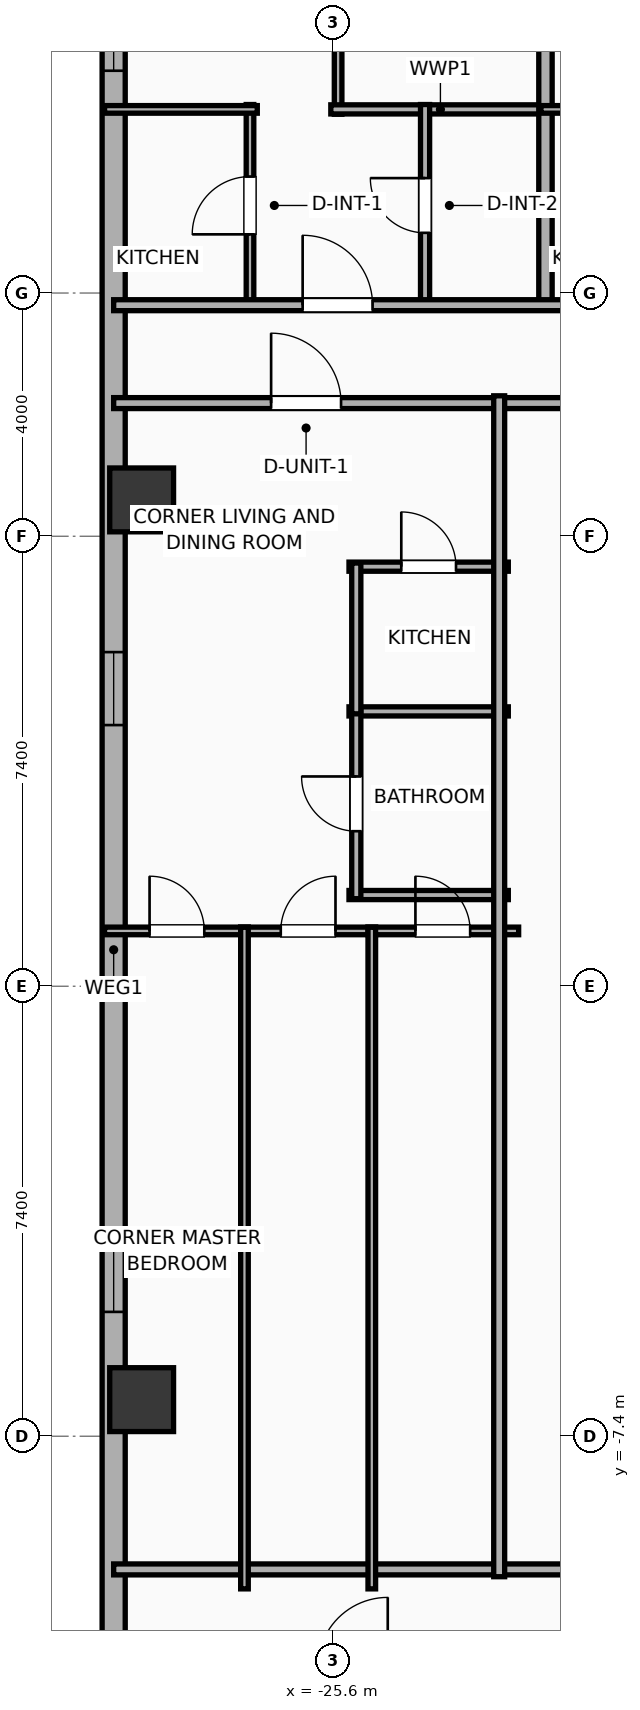
"""IFC4 building model, lengths in metres.
Left out: names, types, materials, properties, quantities, classifications, styles, units other than length and angle.
Written with IfcOpenShell. Run it as: python <this file> out.ifc"""

import sys

from ifc_helpers import new_model, si_unit, direction, frame, frame_2d, origin, origin_2d, place, context, subcontext, project, spatial, rectangle, hollow_rectangle, extrude, element, fill, save


model = new_model("IFC4")
c1 = context("Model", 3, precision=1e-05, world=origin(), true_north=direction((0.0, 1.0)))
c2 = subcontext(c1, "Body", "Model", "MODEL_VIEW")
j1 = project(units=[si_unit("LENGTHUNIT", "METRE"), si_unit("PLANEANGLEUNIT", "RADIAN")], contexts=[c1])
p1 = place(None, origin())
s1 = spatial("IfcSite", under=j1, at=p1, CompositionType="ELEMENT")
p2 = place(p1, origin())
s2 = spatial("IfcBuilding", under=s1, at=p2, CompositionType="ELEMENT")
p3 = place(p2, frame((0.0, 0.0, 120.9)))
s3 = spatial("IfcBuildingStorey", under=s2, at=p3, CompositionType="ELEMENT", Elevation=120.9)
for number, where, z_axis, x_axis in (
    (1, (-28.75, 7.998, 0.0), (0.0, 0.0, 1.0), (1.0, 0.0, 0.0)),
    (2, (-28.75, -6.798, 0.0), (0.0, 0.0, 1.0), (1.0, 0.0, 0.0)),
):
    element("IfcColumn", number, at=place(p3, frame(where, z_axis=z_axis, x_axis=x_axis)), inside=s3, PredefinedType="COLUMN", context=c2, shape_type="SweptSolid", body=[
        extrude(hollow_rectangle(XDim=1.05, YDim=1.05, WallThickness=0.036, at=origin_2d()), origin(), (0.0, 0.0, 1.0), 3.9),
    ])
p4 = place(p3, frame((-29.21, -16.581, 0.0), z_axis=(0.0, 0.0, 1.0), x_axis=(0.0, 1.0, 0.0)))
e3 = element("IfcWall", 3, at=p4, inside=s3, PredefinedType="ELEMENTEDWALL", context=c2, shape_type="SweptSolid", body=[
    extrude(rectangle(XDim=34.363, YDim=0.38, at=frame_2d((17.181, 0.0))), origin(), (0.0, 0.0, 1.0), 3.65),
])
p5 = place(p4, frame((31.637, 0.0, 0.75)))
e4 = element("IfcOpeningElement", 4, at=p5, cuts=e3, PredefinedType="OPENING", context=c2, shape_type="SweptSolid", body=[
    extrude(rectangle(XDim=1.2, YDim=2.05, at=frame_2d((0.6, 1.025))), frame((0.0, 0.2, 0.0), z_axis=(0.0, -1.0, 0.0), x_axis=(1.0, 0.0, 0.0)), (0.0, 0.0, 1.0), 0.4),
])
p6 = place(p4, frame((20.876, 0.0, 0.75)))
e5 = element("IfcOpeningElement", 5, at=p6, cuts=e3, PredefinedType="OPENING", context=c2, shape_type="SweptSolid", body=[
    extrude(rectangle(XDim=1.2, YDim=2.05, at=frame_2d((0.6, 1.025))), frame((0.0, 0.2, 0.0), z_axis=(0.0, -1.0, 0.0), x_axis=(1.0, 0.0, 0.0)), (0.0, 0.0, 1.0), 0.4),
])
p7 = place(p4, frame((11.226, 0.0, 0.75)))
e6 = element("IfcOpeningElement", 6, at=p7, cuts=e3, PredefinedType="OPENING", context=c2, shape_type="SweptSolid", body=[
    extrude(rectangle(XDim=1.2, YDim=2.05, at=frame_2d((0.6, 1.025))), frame((0.0, 0.2, 0.0), z_axis=(0.0, -1.0, 0.0), x_axis=(1.0, 0.0, 0.0)), (0.0, 0.0, 1.0), 0.4),
])
p8 = place(p3, frame((-29.21, 9.59, 0.0), z_axis=(0.0, 0.0, 1.0), x_axis=(1.0, 0.0, 0.0)))
e7 = element("IfcWall", 7, at=p8, inside=s3, PredefinedType="PARTITIONING", context=c2, shape_type="SweptSolid", body=[
    extrude(rectangle(XDim=19.33, YDim=0.18, at=frame_2d((9.665, 0.0))), origin(), (0.0, 0.0, 1.0), 3.65),
])
p9 = place(p8, frame((2.589, 0.0, 0.0)))
e8 = element("IfcOpeningElement", 8, at=p9, cuts=e7, PredefinedType="OPENING", context=c2, shape_type="SweptSolid", body=[
    extrude(rectangle(XDim=1.15, YDim=2.05, at=frame_2d((0.575, 1.025))), frame((0.0, 0.1, 0.0), z_axis=(0.0, -1.0, 0.0), x_axis=(1.0, 0.0, 0.0)), (0.0, 0.0, 1.0), 0.2),
])
p10 = place(p3, frame((-29.21, -9.59, 0.0), z_axis=(0.0, 0.0, 1.0), x_axis=(1.0, 0.0, 0.0)))
e9 = element("IfcWall", 9, at=p10, inside=s3, PredefinedType="PARTITIONING", context=c2, shape_type="SweptSolid", body=[
    extrude(rectangle(XDim=19.33, YDim=0.18, at=frame_2d((9.665, 0.0))), origin(), (0.0, 0.0, 1.0), 3.65),
])
p11 = place(p3, frame((-25.519, 14.34, 0.0), z_axis=(0.0, 0.0, 1.0), x_axis=(0.0, 1.0, 0.0)))
e10 = element("IfcWall", 10, at=p11, inside=s3, PredefinedType="PARTITIONING", context=c2, shape_type="SweptSolid", body=[
    extrude(rectangle(XDim=7.396, YDim=0.125, at=frame_2d((3.698, 0.0))), origin(), (0.0, 0.0, 1.0), 3.65),
])
p12 = place(p11, frame((1.325, 0.0, 0.0)))
e11 = element("IfcOpeningElement", 11, at=p12, cuts=e10, PredefinedType="OPENING", context=c2, shape_type="SweptSolid", body=[
    extrude(rectangle(XDim=0.9, YDim=2.05, at=frame_2d((0.45, 1.025))), frame((0.0, 0.073, 0.0), z_axis=(0.0, -1.0, 0.0), x_axis=(1.0, 0.0, 0.0)), (0.0, 0.0, 1.0), 0.145),
])
p13 = place(p3, frame((-25.639, 14.42, 0.0), z_axis=(0.0, 0.0, 1.0), x_axis=(1.0, 0.0, 0.0)))
e12 = element("IfcWall", 12, at=p13, inside=s3, PredefinedType="PLUMBINGWALL", context=c2, shape_type="SweptSolid", body=[
    extrude(rectangle(XDim=3.605, YDim=0.15, at=frame_2d((1.802, 0.0))), origin(), (0.0, 0.0, 1.0), 3.65),
])
p14 = place(p3, frame((-26.968, 11.18, 0.0), z_axis=(0.0, 0.0, 1.0), x_axis=(0.0, 1.0, 0.0)))
e13 = element("IfcWall", 13, at=p14, inside=s3, PredefinedType="PARTITIONING", context=c2, shape_type="SweptSolid", body=[
    extrude(rectangle(XDim=3.32, YDim=0.125, at=frame_2d((1.66, 0.0))), origin(), (0.0, 0.0, 1.0), 3.65),
])
p15 = place(p14, frame((1.185, 0.0, 0.0)))
e14 = element("IfcOpeningElement", 14, at=p15, cuts=e13, PredefinedType="OPENING", context=c2, shape_type="SweptSolid", body=[
    extrude(rectangle(XDim=0.95, YDim=2.05, at=frame_2d((0.475, 1.025))), frame((0.0, 0.073, 0.0), z_axis=(0.0, -1.0, 0.0), x_axis=(1.0, 0.0, 0.0)), (0.0, 0.0, 1.0), 0.145),
])
p16 = place(p3, frame((-29.36, 14.42, 0.0), z_axis=(0.0, 0.0, 1.0), x_axis=(1.0, 0.0, 0.0)))
e15 = element("IfcWall", 15, at=p16, inside=s3, PredefinedType="PARTITIONING", context=c2, shape_type="SweptSolid", body=[
    extrude(rectangle(XDim=2.512, YDim=0.125, at=frame_2d((1.256, 0.0))), origin(), (0.0, 0.0, 1.0), 3.65),
])
p17 = place(p3, frame((-24.089, 11.18, 0.0), z_axis=(0.0, 0.0, 1.0), x_axis=(0.0, 1.0, 0.0)))
e16 = element("IfcWall", 16, at=p17, inside=s3, PredefinedType="PLUMBINGWALL", context=c2, shape_type="SweptSolid", body=[
    extrude(rectangle(XDim=3.32, YDim=0.15, at=frame_2d((1.66, 0.0))), origin(), (0.0, 0.0, 1.0), 3.65),
])
p18 = place(p17, frame((1.21, 0.0, 0.0)))
e17 = element("IfcOpeningElement", 17, at=p18, cuts=e16, PredefinedType="OPENING", context=c2, shape_type="SweptSolid", body=[
    extrude(rectangle(XDim=0.9, YDim=2.05, at=frame_2d((0.45, 1.025))), frame((0.0, 0.085, 0.0), z_axis=(0.0, -1.0, 0.0), x_axis=(1.0, 0.0, 0.0)), (0.0, 0.0, 1.0), 0.17),
])
p19 = place(p3, frame((-22.109, 11.12, 0.0), z_axis=(0.0, 0.0, 1.0), x_axis=(0.0, 1.0, 0.0)))
e18 = element("IfcWall", 18, at=p19, inside=s3, PredefinedType="PARTITIONING", context=c2, shape_type="SweptSolid", body=[
    extrude(rectangle(XDim=10.49, YDim=0.22, at=frame_2d((5.245, 0.0))), origin(), (0.0, 0.0, 1.0), 3.65),
])
p20 = place(p3, frame((-22.184, 14.42, 0.0), z_axis=(0.0, 0.0, 1.0), x_axis=(1.0, 0.0, 0.0)))
e19 = element("IfcWall", 19, at=p20, inside=s3, PredefinedType="PARTITIONING", context=c2, shape_type="SweptSolid", body=[
    extrude(rectangle(XDim=2.505, YDim=0.125, at=frame_2d((1.252, 0.0))), origin(), (0.0, 0.0, 1.0), 3.65),
])
p21 = place(p3, frame((-29.21, 11.2, 0.0), z_axis=(0.0, 0.0, 1.0), x_axis=(1.0, 0.0, 0.0)))
e20 = element("IfcWall", 20, at=p21, inside=s3, PredefinedType="PARTITIONING", context=c2, shape_type="SweptSolid", body=[
    extrude(rectangle(XDim=62.42, YDim=0.18, at=frame_2d((31.21, 0.0))), origin(), (0.0, 0.0, 1.0), 3.65),
])
p22 = place(p21, frame((3.108, 0.0, 0.0)))
e21 = element("IfcOpeningElement", 21, at=p22, cuts=e20, PredefinedType="OPENING", context=c2, shape_type="SweptSolid", body=[
    extrude(rectangle(XDim=1.15, YDim=2.05, at=frame_2d((0.575, 1.025))), frame((0.0, 0.1, 0.0), z_axis=(0.0, -1.0, 0.0), x_axis=(1.0, 0.0, 0.0)), (0.0, 0.0, 1.0), 0.2),
])
p23 = place(p21, frame((10.242, 0.0, 0.0)))
e22 = element("IfcOpeningElement", 22, at=p23, cuts=e20, PredefinedType="OPENING", context=c2, shape_type="SweptSolid", body=[
    extrude(rectangle(XDim=1.15, YDim=2.05, at=frame_2d((0.575, 1.025))), frame((0.0, 0.1, 0.0), z_axis=(0.0, -1.0, 0.0), x_axis=(1.0, 0.0, 0.0)), (0.0, 0.0, 1.0), 0.2),
])
p24 = place(p21, frame((17.427, 0.0, 0.0)))
e23 = element("IfcOpeningElement", 23, at=p24, cuts=e20, PredefinedType="OPENING", context=c2, shape_type="SweptSolid", body=[
    extrude(rectangle(XDim=0.9, YDim=2.05, at=frame_2d((0.45, 1.025))), frame((0.0, 0.1, 0.0), z_axis=(0.0, -1.0, 0.0), x_axis=(1.0, 0.0, 0.0)), (0.0, 0.0, 1.0), 0.2),
])
p25 = place(p21, frame((24.424, 0.0, 0.0)))
e24 = element("IfcOpeningElement", 24, at=p25, cuts=e20, PredefinedType="OPENING", context=c2, shape_type="SweptSolid", body=[
    extrude(rectangle(XDim=0.9, YDim=2.05, at=frame_2d((0.45, 1.025))), frame((0.0, 0.1, 0.0), z_axis=(0.0, -1.0, 0.0), x_axis=(1.0, 0.0, 0.0)), (0.0, 0.0, 1.0), 0.2),
])
p26 = place(p21, frame((31.428, 0.0, 0.0)))
e25 = element("IfcOpeningElement", 25, at=p26, cuts=e20, PredefinedType="OPENING", context=c2, shape_type="SweptSolid", body=[
    extrude(rectangle(XDim=0.9, YDim=2.05, at=frame_2d((0.45, 1.025))), frame((0.0, 0.1, 0.0), z_axis=(0.0, -1.0, 0.0), x_axis=(1.0, 0.0, 0.0)), (0.0, 0.0, 1.0), 0.2),
])
p27 = place(p21, frame((38.425, 0.0, 0.0)))
e26 = element("IfcOpeningElement", 26, at=p27, cuts=e20, PredefinedType="OPENING", context=c2, shape_type="SweptSolid", body=[
    extrude(rectangle(XDim=0.9, YDim=2.05, at=frame_2d((0.45, 1.025))), frame((0.0, 0.1, 0.0), z_axis=(0.0, -1.0, 0.0), x_axis=(1.0, 0.0, 0.0)), (0.0, 0.0, 1.0), 0.2),
])
p28 = place(p21, frame((45.298, 0.0, 0.0)))
e27 = element("IfcOpeningElement", 27, at=p28, cuts=e20, PredefinedType="OPENING", context=c2, shape_type="SweptSolid", body=[
    extrude(rectangle(XDim=0.9, YDim=2.05, at=frame_2d((0.45, 1.025))), frame((0.0, 0.1, 0.0), z_axis=(0.0, -1.0, 0.0), x_axis=(1.0, 0.0, 0.0)), (0.0, 0.0, 1.0), 0.2),
])
p29 = place(p21, frame((52.033, 0.0, 0.0)))
e28 = element("IfcOpeningElement", 28, at=p29, cuts=e20, PredefinedType="OPENING", context=c2, shape_type="SweptSolid", body=[
    extrude(rectangle(XDim=0.9, YDim=2.05, at=frame_2d((0.45, 1.025))), frame((0.0, 0.1, 0.0), z_axis=(0.0, -1.0, 0.0), x_axis=(1.0, 0.0, 0.0)), (0.0, 0.0, 1.0), 0.2),
])
p30 = place(p21, frame((58.805, 0.0, 0.0)))
e29 = element("IfcOpeningElement", 29, at=p30, cuts=e20, PredefinedType="OPENING", context=c2, shape_type="SweptSolid", body=[
    extrude(rectangle(XDim=0.9, YDim=2.05, at=frame_2d((0.45, 1.025))), frame((0.0, 0.1, 0.0), z_axis=(0.0, -1.0, 0.0), x_axis=(1.0, 0.0, 0.0)), (0.0, 0.0, 1.0), 0.2),
])
p31 = place(p3, frame((-25.34, 6.9, 0.0), z_axis=(0.0, 0.0, 1.0), x_axis=(1.0, 0.0, 0.0)))
e30 = element("IfcWall", 30, at=p31, inside=s3, PredefinedType="PLUMBINGWALL", context=c2, shape_type="SweptSolid", body=[
    extrude(rectangle(XDim=2.62, YDim=0.15, at=frame_2d((1.31, 0.0))), origin(), (0.0, 0.0, 1.0), 3.65),
])
p32 = place(p31, frame((0.86, 0.0, 0.0)))
e31 = element("IfcOpeningElement", 31, at=p32, cuts=e30, PredefinedType="OPENING", context=c2, shape_type="SweptSolid", body=[
    extrude(rectangle(XDim=0.9, YDim=2.05, at=frame_2d((0.45, 1.025))), frame((0.0, 0.085, 0.0), z_axis=(0.0, -1.0, 0.0), x_axis=(1.0, 0.0, 0.0)), (0.0, 0.0, 1.0), 0.17),
])
for number, where, z_axis, x_axis in (
    (32, (-25.34, 4.52, 0.0), (0.0, 0.0, 1.0), (1.0, 0.0, 0.0)),
    (33, (-25.34, 1.5, 0.0), (0.0, 0.0, 1.0), (1.0, 0.0, 0.0)),
):
    element("IfcWall", number, at=place(p3, frame(where, z_axis=z_axis, x_axis=x_axis)), inside=s3, PredefinedType="PLUMBINGWALL", context=c2, shape_type="SweptSolid", body=[
        extrude(rectangle(XDim=2.62, YDim=0.15, at=frame_2d((1.31, 0.0))), origin(), (0.0, 0.0, 1.0), 3.65),
    ])
p33 = place(p3, frame((-25.22, 1.44, 0.0), z_axis=(0.0, 0.0, 1.0), x_axis=(0.0, 1.0, 0.0)))
e34 = element("IfcWall", 34, at=p33, inside=s3, PredefinedType="PLUMBINGWALL", context=c2, shape_type="SweptSolid", body=[
    extrude(rectangle(XDim=3.12, YDim=0.15, at=frame_2d((1.56, 0.0))), origin(), (0.0, 0.0, 1.0), 3.65),
])
p34 = place(p33, frame((1.11, 0.0, 0.0)))
e35 = element("IfcOpeningElement", 35, at=p34, cuts=e34, PredefinedType="OPENING", context=c2, shape_type="SweptSolid", body=[
    extrude(rectangle(XDim=0.9, YDim=2.05, at=frame_2d((0.45, 1.025))), frame((0.0, 0.085, 0.0), z_axis=(0.0, -1.0, 0.0), x_axis=(1.0, 0.0, 0.0)), (0.0, 0.0, 1.0), 0.17),
])
p35 = place(p3, frame((-25.22, 4.48, 0.0), z_axis=(0.0, 0.0, 1.0), x_axis=(0.0, 1.0, 0.0)))
e36 = element("IfcWall", 36, at=p35, inside=s3, PredefinedType="PLUMBINGWALL", context=c2, shape_type="SweptSolid", body=[
    extrude(rectangle(XDim=2.48, YDim=0.15, at=frame_2d((1.24, 0.0))), origin(), (0.0, 0.0, 1.0), 3.65),
])
p36 = place(p3, frame((-29.36, 0.91, 0.0), z_axis=(0.0, 0.0, 1.0), x_axis=(1.0, 0.0, 0.0)))
e37 = element("IfcWall", 37, at=p36, inside=s3, PredefinedType="PARTITIONING", context=c2, shape_type="SweptSolid", body=[
    extrude(rectangle(XDim=2.364, YDim=0.125, at=frame_2d((1.182, 0.0))), origin(), (0.0, 0.0, 1.0), 3.65),
])
p37 = place(p36, frame((0.74, 0.0, 0.0)))
e38 = element("IfcOpeningElement", 38, at=p37, cuts=e37, PredefinedType="OPENING", context=c2, shape_type="SweptSolid", body=[
    extrude(rectangle(XDim=0.9, YDim=2.05, at=frame_2d((0.45, 1.025))), frame((0.0, 0.073, 0.0), z_axis=(0.0, -1.0, 0.0), x_axis=(1.0, 0.0, 0.0)), (0.0, 0.0, 1.0), 0.145),
])
p38 = place(p3, frame((-27.122, 0.91, 0.0), z_axis=(0.0, 0.0, 1.0), x_axis=(1.0, 0.0, 0.0)))
e39 = element("IfcWall", 39, at=p38, inside=s3, PredefinedType="PARTITIONING", context=c2, shape_type="SweptSolid", body=[
    extrude(rectangle(XDim=2.219, YDim=0.125, at=frame_2d((1.109, 0.0))), origin(), (0.0, 0.0, 1.0), 3.65),
])
p39 = place(p38, frame((0.659, 0.0, 0.0)))
e40 = element("IfcOpeningElement", 40, at=p39, cuts=e39, PredefinedType="OPENING", context=c2, shape_type="SweptSolid", body=[
    extrude(rectangle(XDim=0.9, YDim=2.05, at=frame_2d((0.45, 1.025))), frame((0.0, 0.073, 0.0), z_axis=(0.0, -1.0, 0.0), x_axis=(1.0, 0.0, 0.0)), (0.0, 0.0, 1.0), 0.145),
])
p40 = place(p3, frame((-25.028, 0.91, 0.0), z_axis=(0.0, 0.0, 1.0), x_axis=(1.0, 0.0, 0.0)))
e41 = element("IfcWall", 41, at=p40, inside=s3, PredefinedType="PARTITIONING", context=c2, shape_type="SweptSolid", body=[
    extrude(rectangle(XDim=2.478, YDim=0.125, at=frame_2d((1.239, 0.0))), origin(), (0.0, 0.0, 1.0), 3.65),
])
p41 = place(p40, frame((0.78, 0.0, 0.0)))
e42 = element("IfcOpeningElement", 42, at=p41, cuts=e41, PredefinedType="OPENING", context=c2, shape_type="SweptSolid", body=[
    extrude(rectangle(XDim=0.9, YDim=2.05, at=frame_2d((0.45, 1.025))), frame((0.0, 0.073, 0.0), z_axis=(0.0, -1.0, 0.0), x_axis=(1.0, 0.0, 0.0)), (0.0, 0.0, 1.0), 0.145),
])
for number, where, z_axis, x_axis in (
    (43, (-24.965, -9.91, 0.0), (0.0, 0.0, 1.0), (0.0, 1.0, 0.0)),
    (44, (-27.059, -9.91, 0.0), (0.0, 0.0, 1.0), (0.0, 1.0, 0.0)),
):
    element("IfcWall", number, at=place(p3, frame(where, z_axis=z_axis, x_axis=x_axis)), inside=s3, PredefinedType="PARTITIONING", context=c2, shape_type="SweptSolid", body=[
        extrude(rectangle(XDim=10.88, YDim=0.125, at=frame_2d((5.44, 0.0))), origin(), (0.0, 0.0, 1.0), 3.65),
    ])
p42 = place(p3, frame((-22.87, -9.71, 0.0), z_axis=(0.0, 0.0, 1.0), x_axis=(0.0, 1.0, 0.0)))
e45 = element("IfcWall", 45, at=p42, inside=s3, PredefinedType="PARTITIONING", context=c2, shape_type="SweptSolid", body=[
    extrude(rectangle(XDim=19.42, YDim=0.18, at=frame_2d((9.71, 0.0))), origin(), (0.0, 0.0, 1.0), 3.65),
])
p43 = place(p5, origin())
e46 = element("IfcWindow", 46, at=p43, inside=s3, PartitioningType="SINGLE_PANEL", PredefinedType="WINDOW", context=c2, shape_type="SweptSolid", body=[
    extrude(rectangle(XDim=1.2, YDim=2.05, at=frame_2d((0.6, 1.025))), frame((0.0, 0.03, 0.0), z_axis=(0.0, -1.0, 0.0), x_axis=(1.0, 0.0, 0.0)), (0.0, 0.0, 1.0), 0.06),
])
fill(e4, e46)
p44 = place(p6, origin())
e47 = element("IfcWindow", 47, at=p44, inside=s3, PartitioningType="SINGLE_PANEL", PredefinedType="WINDOW", context=c2, shape_type="SweptSolid", body=[
    extrude(rectangle(XDim=1.2, YDim=2.05, at=frame_2d((0.6, 1.025))), frame((0.0, 0.03, 0.0), z_axis=(0.0, -1.0, 0.0), x_axis=(1.0, 0.0, 0.0)), (0.0, 0.0, 1.0), 0.06),
])
fill(e5, e47)
p45 = place(p7, origin())
e48 = element("IfcWindow", 48, at=p45, inside=s3, PartitioningType="SINGLE_PANEL", PredefinedType="WINDOW", context=c2, shape_type="SweptSolid", body=[
    extrude(rectangle(XDim=1.2, YDim=2.05, at=frame_2d((0.6, 1.025))), frame((0.0, 0.03, 0.0), z_axis=(0.0, -1.0, 0.0), x_axis=(1.0, 0.0, 0.0)), (0.0, 0.0, 1.0), 0.06),
])
fill(e6, e48)
p46 = place(p9, origin())
e49 = element("IfcDoor", 49, at=p46, inside=s3, OperationType="SINGLE_SWING_LEFT", PredefinedType="DOOR", context=c2, shape_type="SweptSolid", body=[
    extrude(rectangle(XDim=1.15, YDim=2.05, at=frame_2d((0.575, 1.025))), frame((0.0, 0.025, 0.0), z_axis=(0.0, -1.0, 0.0), x_axis=(1.0, 0.0, 0.0)), (0.0, 0.0, 1.0), 0.05),
])
fill(e8, e49)
p47 = place(p15, origin())
e50 = element("IfcDoor", 50, at=p47, inside=s3, OperationType="SINGLE_SWING_LEFT", PredefinedType="DOOR", context=c2, shape_type="SweptSolid", body=[
    extrude(rectangle(XDim=0.95, YDim=2.05, at=frame_2d((0.475, 1.025))), frame((0.0, 0.025, 0.0), z_axis=(0.0, -1.0, 0.0), x_axis=(1.0, 0.0, 0.0)), (0.0, 0.0, 1.0), 0.05),
])
fill(e14, e50)
p48 = place(p18, origin())
e51 = element("IfcDoor", 51, at=p48, inside=s3, OperationType="SINGLE_SWING_RIGHT", PredefinedType="DOOR", context=c2, shape_type="SweptSolid", body=[
    extrude(rectangle(XDim=0.9, YDim=2.05, at=frame_2d((0.45, 1.025))), frame((0.0, 0.025, 0.0), z_axis=(0.0, -1.0, 0.0), x_axis=(1.0, 0.0, 0.0)), (0.0, 0.0, 1.0), 0.05),
])
fill(e17, e51)
p49 = place(p22, origin())
e52 = element("IfcDoor", 52, at=p49, inside=s3, OperationType="SINGLE_SWING_LEFT", PredefinedType="DOOR", context=c2, shape_type="SweptSolid", body=[
    extrude(rectangle(XDim=1.15, YDim=2.05, at=frame_2d((0.575, 1.025))), frame((0.0, 0.025, 0.0), z_axis=(0.0, -1.0, 0.0), x_axis=(1.0, 0.0, 0.0)), (0.0, 0.0, 1.0), 0.05),
])
fill(e21, e52)
p50 = place(p32, origin())
e53 = element("IfcDoor", 53, at=p50, inside=s3, OperationType="SINGLE_SWING_LEFT", PredefinedType="DOOR", context=c2, shape_type="SweptSolid", body=[
    extrude(rectangle(XDim=0.9, YDim=2.05, at=frame_2d((0.45, 1.025))), frame((0.0, 0.025, 0.0), z_axis=(0.0, -1.0, 0.0), x_axis=(1.0, 0.0, 0.0)), (0.0, 0.0, 1.0), 0.05),
])
fill(e31, e53)
p51 = place(p34, origin())
e54 = element("IfcDoor", 54, at=p51, inside=s3, OperationType="SINGLE_SWING_RIGHT", PredefinedType="DOOR", context=c2, shape_type="SweptSolid", body=[
    extrude(rectangle(XDim=0.9, YDim=2.05, at=frame_2d((0.45, 1.025))), frame((0.0, 0.025, 0.0), z_axis=(0.0, -1.0, 0.0), x_axis=(1.0, 0.0, 0.0)), (0.0, 0.0, 1.0), 0.05),
])
fill(e35, e54)
p52 = place(p37, origin())
e55 = element("IfcDoor", 55, at=p52, inside=s3, OperationType="SINGLE_SWING_LEFT", PredefinedType="DOOR", context=c2, shape_type="SweptSolid", body=[
    extrude(rectangle(XDim=0.9, YDim=2.05, at=frame_2d((0.45, 1.025))), frame((0.0, 0.025, 0.0), z_axis=(0.0, -1.0, 0.0), x_axis=(1.0, 0.0, 0.0)), (0.0, 0.0, 1.0), 0.05),
])
fill(e38, e55)
p53 = place(p39, origin())
e56 = element("IfcDoor", 56, at=p53, inside=s3, OperationType="SINGLE_SWING_RIGHT", PredefinedType="DOOR", context=c2, shape_type="SweptSolid", body=[
    extrude(rectangle(XDim=0.9, YDim=2.05, at=frame_2d((0.45, 1.025))), frame((0.0, 0.025, 0.0), z_axis=(0.0, -1.0, 0.0), x_axis=(1.0, 0.0, 0.0)), (0.0, 0.0, 1.0), 0.05),
])
fill(e40, e56)
p54 = place(p41, origin())
e57 = element("IfcDoor", 57, at=p54, inside=s3, OperationType="SINGLE_SWING_LEFT", PredefinedType="DOOR", context=c2, shape_type="SweptSolid", body=[
    extrude(rectangle(XDim=0.9, YDim=2.05, at=frame_2d((0.45, 1.025))), frame((0.0, 0.025, 0.0), z_axis=(0.0, -1.0, 0.0), x_axis=(1.0, 0.0, 0.0)), (0.0, 0.0, 1.0), 0.05),
])
fill(e42, e57)
save(model, sys.argv[1])
